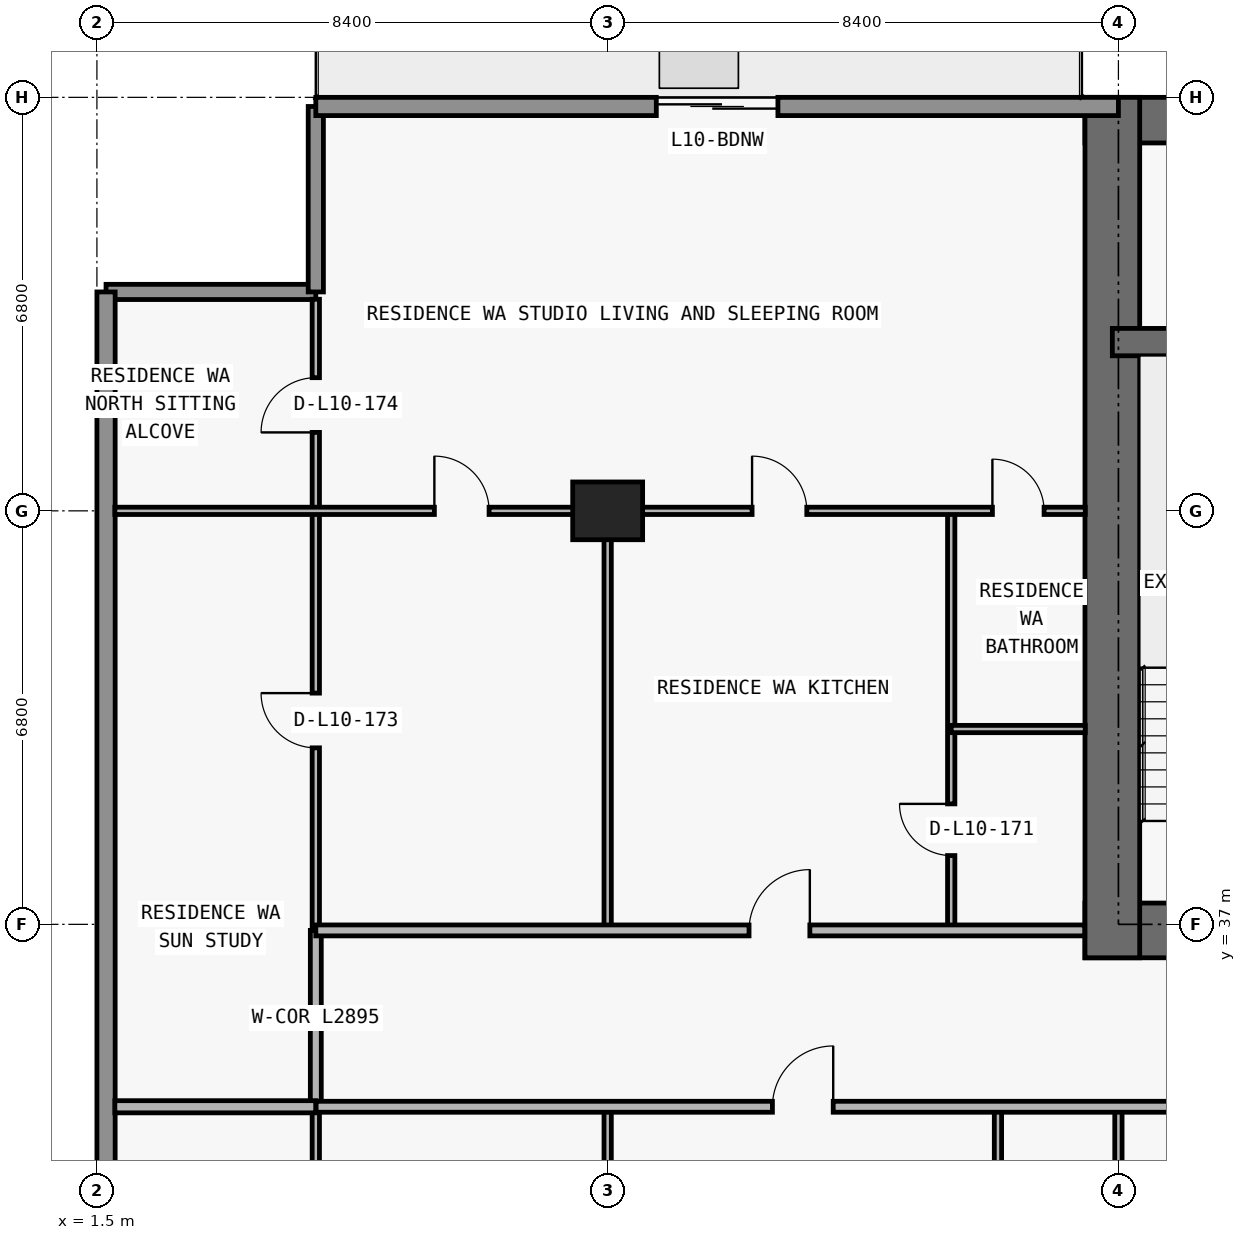
"""IFC4 building model, lengths in metres.
Left out: names, types, materials, properties, quantities, classifications, styles, units other than length and angle.
Written with IfcOpenShell. Run it as: python <this file> out.ifc"""

import sys

from ifc_helpers import new_model, si_unit, direction, frame, frame_2d, origin, origin_2d, place, context, subcontext, project, spatial, rectangle, extrude, element, fill, save


model = new_model("IFC4")
c1 = context("Model", 3, precision=1e-05, world=origin(), true_north=direction((0.0, 1.0)))
c2 = subcontext(c1, "Body", "Model", "MODEL_VIEW")
j1 = project(units=[si_unit("LENGTHUNIT", "METRE"), si_unit("PLANEANGLEUNIT", "RADIAN")], contexts=[c1])
p1 = place(None, origin())
s1 = spatial("IfcSite", under=j1, at=p1, CompositionType="ELEMENT")
p2 = place(p1, origin())
s2 = spatial("IfcBuilding", under=s1, at=p2, CompositionType="ELEMENT")
p3 = place(p2, frame((0.0, 0.0, 43.2)))
s3 = spatial("IfcBuildingStorey", under=s2, at=p3, CompositionType="ELEMENT", Elevation=43.2)
p4 = place(p3, frame((9.9, 43.8, 0.0), z_axis=(0.0, 0.0, 1.0), x_axis=(1.0, 0.0, 0.0)))
e1 = element("IfcColumn", 1, at=p4, inside=s3, PredefinedType="COLUMN", context=c2, shape_type="SweptSolid", body=[
    extrude(rectangle(XDim=1.15, YDim=0.95, at=origin_2d()), origin(), (0.0, 0.0, 1.0), 3.05),
])
p5 = place(p3, frame((17.75, 36.9, 0.0), z_axis=(0.0, 0.0, 1.0), x_axis=(1.0, 0.0, 0.0)))
e2 = element("IfcWall", 2, at=p5, inside=s3, PredefinedType="SHEAR", context=c2, shape_type="SweptSolid", body=[
    extrude(rectangle(XDim=42.3, YDim=0.9, at=frame_2d((21.15, 0.0))), origin(), (0.0, 0.0, 1.0), 3.05),
])
p6 = place(p5, frame((14.55, 0.0, 0.0)))
e3 = element("IfcOpeningElement", 3, at=p6, cuts=e2, PredefinedType="OPENING", context=c2, shape_type="SweptSolid", body=[
    extrude(rectangle(XDim=1.1, YDim=2.15, at=frame_2d((0.55, 1.075))), frame((0.0, 0.46, 0.0), z_axis=(0.0, -1.0, 0.0), x_axis=(1.0, 0.0, 0.0)), (0.0, 0.0, 1.0), 0.92),
])
p7 = place(p5, frame((6.4, 0.0, 0.0)))
e4 = element("IfcOpeningElement", 4, at=p7, cuts=e2, PredefinedType="OPENING", context=c2, shape_type="SweptSolid", body=[
    extrude(rectangle(XDim=1.05, YDim=2.15, at=frame_2d((0.525, 1.075))), frame((0.0, 0.46, 0.0), z_axis=(0.0, -1.0, 0.0), x_axis=(1.0, 0.0, 0.0)), (0.0, 0.0, 1.0), 0.92),
])
p8 = place(p5, frame((34.9, 0.0, 0.0)))
e5 = element("IfcOpeningElement", 5, at=p8, cuts=e2, PredefinedType="OPENING", context=c2, shape_type="SweptSolid", body=[
    extrude(rectangle(XDim=1.05, YDim=2.15, at=frame_2d((0.525, 1.075))), frame((0.0, 0.46, 0.0), z_axis=(0.0, -1.0, 0.0), x_axis=(1.0, 0.0, 0.0)), (0.0, 0.0, 1.0), 0.92),
])
p9 = place(p5, frame((11.012, 0.0, 0.0)))
e6 = element("IfcOpeningElement", 6, at=p9, cuts=e2, PredefinedType="OPENING", context=c2, shape_type="SweptSolid", body=[
    extrude(rectangle(XDim=1.05, YDim=2.15, at=frame_2d((0.525, 1.075))), frame((0.0, 0.46, 0.0), z_axis=(0.0, -1.0, 0.0), x_axis=(1.0, 0.0, 0.0)), (0.0, 0.0, 1.0), 0.92),
])
p10 = place(p5, frame((24.25, 0.0, 0.0)))
e7 = element("IfcOpeningElement", 7, at=p10, cuts=e2, PredefinedType="OPENING", context=c2, shape_type="SweptSolid", body=[
    extrude(rectangle(XDim=1.05, YDim=2.15, at=frame_2d((0.525, 1.075))), frame((0.0, 0.46, 0.0), z_axis=(0.0, -1.0, 0.0), x_axis=(1.0, 0.0, 0.0)), (0.0, 0.0, 1.0), 0.92),
])
p11 = place(p3, frame((17.75, 50.225, 0.0), z_axis=(0.0, 0.0, 1.0), x_axis=(1.0, 0.0, 0.0)))
e8 = element("IfcWall", 8, at=p11, inside=s3, PredefinedType="SHEAR", context=c2, shape_type="SweptSolid", body=[
    extrude(rectangle(XDim=42.3, YDim=0.75, at=frame_2d((21.15, 0.0))), origin(), (0.0, 0.0, 1.0), 3.05),
])
p12 = place(p3, frame((18.2, 36.45, 0.0), z_axis=(0.0, 0.0, 1.0), x_axis=(0.0, 1.0, 0.0)))
e9 = element("IfcWall", 9, at=p12, inside=s3, PredefinedType="SHEAR", context=c2, shape_type="SweptSolid", body=[
    extrude(rectangle(XDim=14.15, YDim=0.9, at=frame_2d((7.075, 0.0))), origin(), (0.0, 0.0, 1.0), 3.05),
])
p13 = place(p3, frame((18.2, 46.575, 0.0), z_axis=(0.0, 0.0, 1.0), x_axis=(1.0, 0.0, 0.0)))
e10 = element("IfcWall", 10, at=p13, inside=s3, PredefinedType="SHEAR", context=c2, shape_type="SweptSolid", body=[
    extrude(rectangle(XDim=41.4, YDim=0.45, at=frame_2d((20.7, 0.0))), origin(), (0.0, 0.0, 1.0), 3.05),
])
p14 = place(p13, frame((7.675, 0.0, 0.0)))
e11 = element("IfcOpeningElement", 11, at=p14, cuts=e10, PredefinedType="OPENING", context=c2, shape_type="SweptSolid", body=[
    extrude(rectangle(XDim=1.05, YDim=2.15, at=frame_2d((0.525, 1.075))), frame((0.0, 0.235, 0.0), z_axis=(0.0, -1.0, 0.0), x_axis=(1.0, 0.0, 0.0)), (0.0, 0.0, 1.0), 0.47),
])
p15 = place(p13, frame((32.725, 0.0, 0.0)))
e12 = element("IfcOpeningElement", 12, at=p15, cuts=e10, PredefinedType="OPENING", context=c2, shape_type="SweptSolid", body=[
    extrude(rectangle(XDim=1.05, YDim=2.15, at=frame_2d((0.525, 1.075))), frame((0.0, 0.235, 0.0), z_axis=(0.0, -1.0, 0.0), x_axis=(1.0, 0.0, 0.0)), (0.0, 0.0, 1.0), 0.47),
])
p16 = place(p3, frame((1.65, 47.4, 0.0), z_axis=(0.0, 0.0, 1.0), x_axis=(1.0, 0.0, 0.0)))
e13 = element("IfcWall", 13, at=p16, inside=s3, PredefinedType="ELEMENTEDWALL", context=c2, shape_type="SweptSolid", body=[
    extrude(rectangle(XDim=3.45, YDim=0.25, at=frame_2d((1.725, 0.0))), origin(), (0.0, 0.0, 1.0), 3.05),
])
p17 = place(p3, frame((5.1, 47.4, 0.0), z_axis=(0.0, 0.0, 1.0), x_axis=(0.0, 1.0, 0.0)))
e14 = element("IfcWall", 14, at=p17, inside=s3, PredefinedType="ELEMENTEDWALL", context=c2, shape_type="SweptSolid", body=[
    extrude(rectangle(XDim=3.05, YDim=0.25, at=frame_2d((1.525, 0.0))), origin(), (0.0, 0.0, 1.0), 3.05),
])
p18 = place(p3, frame((1.65, 26.8, 0.0), z_axis=(0.0, 0.0, 1.0), x_axis=(0.0, 1.0, 0.0)))
e15 = element("IfcWall", 15, at=p18, inside=s3, PredefinedType="STANDARD", context=c2, shape_type="SweptSolid", body=[
    extrude(rectangle(XDim=20.6, YDim=0.3, at=frame_2d((10.3, 0.0))), origin(), (0.0, 0.0, 1.0), 3.05),
])
p19 = place(p3, frame((5.1, 50.45, 0.0), z_axis=(0.0, 0.0, 1.0), x_axis=(1.0, 0.0, 0.0)))
e16 = element("IfcWall", 16, at=p19, inside=s3, PredefinedType="STANDARD", context=c2, shape_type="SweptSolid", body=[
    extrude(rectangle(XDim=13.2, YDim=0.3, at=frame_2d((6.6, 0.0))), origin(), (0.0, 0.0, 1.0), 3.05),
])
p20 = place(p19, frame((5.6, 0.0, 0.0)))
e17 = element("IfcOpeningElement", 17, at=p20, cuts=e16, PredefinedType="OPENING", context=c2, shape_type="SweptSolid", body=[
    extrude(rectangle(XDim=2.0, YDim=2.3, at=frame_2d((1.0, 1.15))), frame((0.0, 0.16, 0.0), z_axis=(0.0, -1.0, 0.0), x_axis=(1.0, 0.0, 0.0)), (0.0, 0.0, 1.0), 0.32),
])
p21 = place(p3, frame((5.1, 28.84, 0.0), z_axis=(0.0, 0.0, 1.0), x_axis=(0.0, 1.0, 0.0)))
e18 = element("IfcWall", 18, at=p21, inside=s3, PredefinedType="PARTITIONING", context=c2, shape_type="SweptSolid", body=[
    extrude(rectangle(XDim=5.16, YDim=0.12, at=frame_2d((2.58, 0.0))), origin(), (0.0, 0.0, 1.0), 3.05),
])
p22 = place(p3, frame((5.1, 34.005, 0.0), z_axis=(0.0, 0.0, 1.0), x_axis=(0.0, 1.0, 0.0)))
e19 = element("IfcWall", 19, at=p22, inside=s3, PredefinedType="PARTITIONING", context=c2, shape_type="SweptSolid", body=[
    extrude(rectangle(XDim=2.895, YDim=0.18, at=frame_2d((1.448, 0.0))), origin(), (0.0, 0.0, 1.0), 3.05),
])
p23 = place(p3, frame((5.1, 36.905, 0.0), z_axis=(0.0, 0.0, 1.0), x_axis=(0.0, 1.0, 0.0)))
e20 = element("IfcWall", 20, at=p23, inside=s3, PredefinedType="PARTITIONING", context=c2, shape_type="SweptSolid", body=[
    extrude(rectangle(XDim=10.375, YDim=0.12, at=frame_2d((5.188, 0.0))), origin(), (0.0, 0.0, 1.0), 3.05),
])
p24 = place(p23, frame((2.998, 0.0, 0.0)))
e21 = element("IfcOpeningElement", 21, at=p24, cuts=e20, PredefinedType="OPENING", context=c2, shape_type="SweptSolid", body=[
    extrude(rectangle(XDim=0.9, YDim=2.15, at=frame_2d((0.45, 1.075))), frame((0.0, 0.07, 0.0), z_axis=(0.0, -1.0, 0.0), x_axis=(1.0, 0.0, 0.0)), (0.0, 0.0, 1.0), 0.14),
])
p25 = place(p23, frame((8.185, 0.0, 0.0)))
e22 = element("IfcOpeningElement", 22, at=p25, cuts=e20, PredefinedType="OPENING", context=c2, shape_type="SweptSolid", body=[
    extrude(rectangle(XDim=0.9, YDim=2.15, at=frame_2d((0.45, 1.075))), frame((0.0, 0.07, 0.0), z_axis=(0.0, -1.0, 0.0), x_axis=(1.0, 0.0, 0.0)), (0.0, 0.0, 1.0), 0.14),
])
p26 = place(p3, frame((9.9, 28.84, 0.0), z_axis=(0.0, 0.0, 1.0), x_axis=(0.0, 1.0, 0.0)))
e23 = element("IfcWall", 23, at=p26, inside=s3, PredefinedType="PARTITIONING", context=c2, shape_type="SweptSolid", body=[
    extrude(rectangle(XDim=5.16, YDim=0.12, at=frame_2d((2.58, 0.0))), origin(), (0.0, 0.0, 1.0), 2.11),
])
p27 = place(p3, frame((9.9, 36.9, 0.0), z_axis=(0.0, 0.0, 1.0), x_axis=(0.0, 1.0, 0.0)))
e24 = element("IfcWall", 24, at=p27, inside=s3, PredefinedType="PARTITIONING", context=c2, shape_type="SweptSolid", body=[
    extrude(rectangle(XDim=6.9, YDim=0.12, at=frame_2d((3.45, 0.0))), origin(), (0.0, 0.0, 1.0), 2.11),
])
p28 = place(p3, frame((15.55, 36.9, 0.0), z_axis=(0.0, 0.0, 1.0), x_axis=(0.0, 1.0, 0.0)))
e25 = element("IfcWall", 25, at=p28, inside=s3, PredefinedType="PARTITIONING", context=c2, shape_type="SweptSolid", body=[
    extrude(rectangle(XDim=6.9, YDim=0.12, at=frame_2d((3.45, 0.0))), origin(), (0.0, 0.0, 1.0), 3.05),
])
p29 = place(p28, frame((1.231, 0.0, 0.0)))
e26 = element("IfcOpeningElement", 26, at=p29, cuts=e25, PredefinedType="OPENING", context=c2, shape_type="SweptSolid", body=[
    extrude(rectangle(XDim=0.85, YDim=2.1, at=frame_2d((0.425, 1.05))), frame((0.0, 0.07, 0.0), z_axis=(0.0, -1.0, 0.0), x_axis=(1.0, 0.0, 0.0)), (0.0, 0.0, 1.0), 0.14),
])
p30 = place(p3, frame((16.319, 28.84, 0.0), z_axis=(0.0, 0.0, 1.0), x_axis=(0.0, 1.0, 0.0)))
e27 = element("IfcWall", 27, at=p30, inside=s3, PredefinedType="PARTITIONING", context=c2, shape_type="SweptSolid", body=[
    extrude(rectangle(XDim=5.16, YDim=0.12, at=frame_2d((2.58, 0.0))), origin(), (0.0, 0.0, 1.0), 3.05),
])
p31 = place(p30, frame((2.155, 0.0, 0.0)))
e28 = element("IfcOpeningElement", 28, at=p31, cuts=e27, PredefinedType="OPENING", context=c2, shape_type="SweptSolid", body=[
    extrude(rectangle(XDim=0.85, YDim=2.1, at=frame_2d((0.425, 1.05))), frame((0.0, 0.07, 0.0), z_axis=(0.0, -1.0, 0.0), x_axis=(1.0, 0.0, 0.0)), (0.0, 0.0, 1.0), 0.14),
])
p32 = place(p3, frame((18.3, 28.84, 0.0), z_axis=(0.0, 0.0, 1.0), x_axis=(0.0, 1.0, 0.0)))
e29 = element("IfcWall", 29, at=p32, inside=s3, PredefinedType="PARTITIONING", context=c2, shape_type="SweptSolid", body=[
    extrude(rectangle(XDim=5.16, YDim=0.12, at=frame_2d((2.58, 0.0))), origin(), (0.0, 0.0, 1.0), 2.11),
])
p33 = place(p3, frame((1.795, 34.0, 0.0), z_axis=(0.0, 0.0, 1.0), x_axis=(1.0, 0.0, 0.0)))
e30 = element("IfcWall", 30, at=p33, inside=s3, PredefinedType="PARTITIONING", context=c2, shape_type="SweptSolid", body=[
    extrude(rectangle(XDim=3.305, YDim=0.2, at=frame_2d((1.653, 0.0))), origin(), (0.0, 0.0, 1.0), 3.05),
])
p34 = place(p3, frame((5.105, 34.0, 0.0), z_axis=(0.0, 0.0, 1.0), x_axis=(1.0, 0.0, 0.0)))
e31 = element("IfcWall", 31, at=p34, inside=s3, PredefinedType="PARTITIONING", context=c2, shape_type="SweptSolid", body=[
    extrude(rectangle(XDim=21.545, YDim=0.18, at=frame_2d((10.772, 0.0))), origin(), (0.0, 0.0, 1.0), 3.05),
])
p35 = place(p34, frame((7.504, 0.0, 0.0)))
e32 = element("IfcOpeningElement", 32, at=p35, cuts=e31, PredefinedType="OPENING", context=c2, shape_type="SweptSolid", body=[
    extrude(rectangle(XDim=1.0, YDim=2.2, at=frame_2d((0.5, 1.1))), frame((0.0, 0.1, 0.0), z_axis=(0.0, -1.0, 0.0), x_axis=(1.0, 0.0, 0.0)), (0.0, 0.0, 1.0), 0.2),
])
p36 = place(p3, frame((5.1, 36.9, 0.0), z_axis=(0.0, 0.0, 1.0), x_axis=(1.0, 0.0, 0.0)))
e33 = element("IfcWall", 33, at=p36, inside=s3, PredefinedType="PARTITIONING", context=c2, shape_type="SweptSolid", body=[
    extrude(rectangle(XDim=12.645, YDim=0.18, at=frame_2d((6.323, 0.0))), origin(), (0.0, 0.0, 1.0), 3.05),
])
p37 = place(p36, frame((7.125, 0.0, 0.0)))
e34 = element("IfcOpeningElement", 34, at=p37, cuts=e33, PredefinedType="OPENING", context=c2, shape_type="SweptSolid", body=[
    extrude(rectangle(XDim=1.0, YDim=2.2, at=frame_2d((0.5, 1.1))), frame((0.0, 0.1, 0.0), z_axis=(0.0, -1.0, 0.0), x_axis=(1.0, 0.0, 0.0)), (0.0, 0.0, 1.0), 0.2),
])
p38 = place(p3, frame((15.55, 40.212, 0.0), z_axis=(0.0, 0.0, 1.0), x_axis=(1.0, 0.0, 0.0)))
e35 = element("IfcWall", 35, at=p38, inside=s3, PredefinedType="PARTITIONING", context=c2, shape_type="SweptSolid", body=[
    extrude(rectangle(XDim=2.205, YDim=0.12, at=frame_2d((1.103, 0.0))), origin(), (0.0, 0.0, 1.0), 3.05),
])
p39 = place(p3, frame((1.795, 43.8, 0.0), z_axis=(0.0, 0.0, 1.0), x_axis=(1.0, 0.0, 0.0)))
e36 = element("IfcWall", 36, at=p39, inside=s3, PredefinedType="PARTITIONING", context=c2, shape_type="SweptSolid", body=[
    extrude(rectangle(XDim=15.96, YDim=0.12, at=frame_2d((7.98, 0.0))), origin(), (0.0, 0.0, 1.0), 2.339),
])
p40 = place(p39, frame((5.255, 0.0, 0.0)))
e37 = element("IfcOpeningElement", 37, at=p40, cuts=e36, PredefinedType="OPENING", context=c2, shape_type="SweptSolid", body=[
    extrude(rectangle(XDim=0.9, YDim=2.15, at=frame_2d((0.45, 1.075))), frame((0.0, 0.07, 0.0), z_axis=(0.0, -1.0, 0.0), x_axis=(1.0, 0.0, 0.0)), (0.0, 0.0, 1.0), 0.14),
])
p41 = place(p39, frame((10.48, 0.0, 0.0)))
e38 = element("IfcOpeningElement", 38, at=p41, cuts=e36, PredefinedType="OPENING", context=c2, shape_type="SweptSolid", body=[
    extrude(rectangle(XDim=0.9, YDim=2.15, at=frame_2d((0.45, 1.075))), frame((0.0, 0.07, 0.0), z_axis=(0.0, -1.0, 0.0), x_axis=(1.0, 0.0, 0.0)), (0.0, 0.0, 1.0), 0.14),
])
p42 = place(p39, frame((14.433, 0.0, 0.0)))
e39 = element("IfcOpeningElement", 39, at=p42, cuts=e36, PredefinedType="OPENING", context=c2, shape_type="SweptSolid", body=[
    extrude(rectangle(XDim=0.85, YDim=2.1, at=frame_2d((0.425, 1.05))), frame((0.0, 0.07, 0.0), z_axis=(0.0, -1.0, 0.0), x_axis=(1.0, 0.0, 0.0)), (0.0, 0.0, 1.0), 0.14),
])
p43 = place(p20, origin())
e40 = element("IfcDoor", 40, at=p43, inside=s3, OperationType="DOUBLE_DOOR_SLIDING", PredefinedType="DOOR", context=c2, shape_type="SweptSolid", body=[
    extrude(rectangle(XDim=2.0, YDim=2.3, at=frame_2d((1.0, 1.15))), frame((0.0, 0.025, 0.0), z_axis=(0.0, -1.0, 0.0), x_axis=(1.0, 0.0, 0.0)), (0.0, 0.0, 1.0), 0.05),
])
fill(e17, e40)
p44 = place(p35, origin())
e41 = element("IfcDoor", 41, at=p44, inside=s3, OperationType="SINGLE_SWING_RIGHT", PredefinedType="DOOR", context=c2, shape_type="SweptSolid", body=[
    extrude(rectangle(XDim=1.0, YDim=2.2, at=frame_2d((0.5, 1.1))), frame((0.0, 0.025, 0.0), z_axis=(0.0, -1.0, 0.0), x_axis=(1.0, 0.0, 0.0)), (0.0, 0.0, 1.0), 0.05),
])
fill(e32, e41)
p45 = place(p40, origin())
e42 = element("IfcDoor", 42, at=p45, inside=s3, OperationType="SINGLE_SWING_LEFT", PredefinedType="DOOR", context=c2, shape_type="SweptSolid", body=[
    extrude(rectangle(XDim=0.9, YDim=2.15, at=frame_2d((0.45, 1.075))), frame((0.0, 0.025, 0.0), z_axis=(0.0, -1.0, 0.0), x_axis=(1.0, 0.0, 0.0)), (0.0, 0.0, 1.0), 0.05),
])
fill(e37, e42)
p46 = place(p37, origin())
e43 = element("IfcDoor", 43, at=p46, inside=s3, OperationType="SINGLE_SWING_RIGHT", PredefinedType="DOOR", context=c2, shape_type="SweptSolid", body=[
    extrude(rectangle(XDim=1.0, YDim=2.2, at=frame_2d((0.5, 1.1))), frame((0.0, 0.025, 0.0), z_axis=(0.0, -1.0, 0.0), x_axis=(1.0, 0.0, 0.0)), (0.0, 0.0, 1.0), 0.05),
])
fill(e34, e43)
p47 = place(p41, origin())
e44 = element("IfcDoor", 44, at=p47, inside=s3, OperationType="SINGLE_SWING_LEFT", PredefinedType="DOOR", context=c2, shape_type="SweptSolid", body=[
    extrude(rectangle(XDim=0.9, YDim=2.15, at=frame_2d((0.45, 1.075))), frame((0.0, 0.025, 0.0), z_axis=(0.0, -1.0, 0.0), x_axis=(1.0, 0.0, 0.0)), (0.0, 0.0, 1.0), 0.05),
])
fill(e38, e44)
p48 = place(p29, origin())
e45 = element("IfcDoor", 45, at=p48, inside=s3, OperationType="SINGLE_SWING_RIGHT", PredefinedType="DOOR", context=c2, shape_type="SweptSolid", body=[
    extrude(rectangle(XDim=0.85, YDim=2.1, at=frame_2d((0.425, 1.05))), frame((0.0, 0.025, 0.0), z_axis=(0.0, -1.0, 0.0), x_axis=(1.0, 0.0, 0.0)), (0.0, 0.0, 1.0), 0.05),
])
fill(e26, e45)
p49 = place(p42, origin())
e46 = element("IfcDoor", 46, at=p49, inside=s3, OperationType="SINGLE_SWING_LEFT", PredefinedType="DOOR", context=c2, shape_type="SweptSolid", body=[
    extrude(rectangle(XDim=0.85, YDim=2.1, at=frame_2d((0.425, 1.05))), frame((0.0, 0.025, 0.0), z_axis=(0.0, -1.0, 0.0), x_axis=(1.0, 0.0, 0.0)), (0.0, 0.0, 1.0), 0.05),
])
fill(e39, e46)
p50 = place(p24, origin())
e47 = element("IfcDoor", 47, at=p50, inside=s3, OperationType="SINGLE_SWING_RIGHT", PredefinedType="DOOR", context=c2, shape_type="SweptSolid", body=[
    extrude(rectangle(XDim=0.9, YDim=2.15, at=frame_2d((0.45, 1.075))), frame((0.0, 0.025, 0.0), z_axis=(0.0, -1.0, 0.0), x_axis=(1.0, 0.0, 0.0)), (0.0, 0.0, 1.0), 0.05),
])
fill(e21, e47)
p51 = place(p25, origin())
e48 = element("IfcDoor", 48, at=p51, inside=s3, OperationType="SINGLE_SWING_LEFT", PredefinedType="DOOR", context=c2, shape_type="SweptSolid", body=[
    extrude(rectangle(XDim=0.9, YDim=2.15, at=frame_2d((0.45, 1.075))), frame((0.0, 0.025, 0.0), z_axis=(0.0, -1.0, 0.0), x_axis=(1.0, 0.0, 0.0)), (0.0, 0.0, 1.0), 0.05),
])
fill(e22, e48)
save(model, sys.argv[1])
